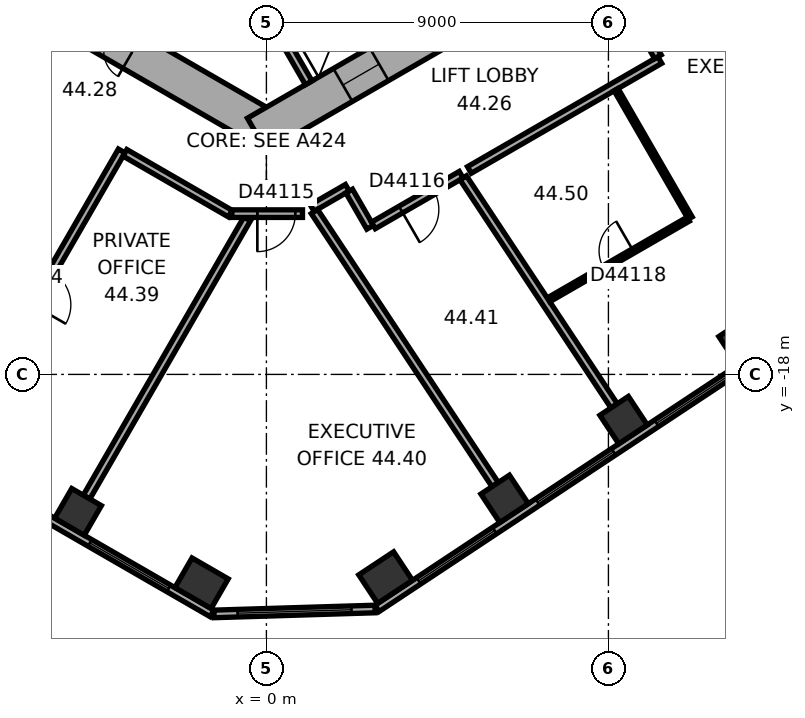
"""IFC4 building model, lengths in metres.
Left out: names, types, materials, properties, quantities, classifications, styles, units other than length and angle.
Written with IfcOpenShell. Run it as: python <this file> out.ifc"""

import sys

from ifc_helpers import new_model, si_unit, direction, frame, frame_2d, origin, origin_2d, place, context, subcontext, project, spatial, rectangle, extrude, element, fill, save


model = new_model("IFC4")
c1 = context("Model", 3, precision=1e-05, world=origin(), true_north=direction((0.0, 1.0)))
c2 = subcontext(c1, "Body", "Model", "MODEL_VIEW")
j1 = project(units=[si_unit("LENGTHUNIT", "METRE"), si_unit("PLANEANGLEUNIT", "RADIAN")], contexts=[c1])
p1 = place(None, origin())
s1 = spatial("IfcSite", under=j1, at=p1, CompositionType="ELEMENT")
p2 = place(p1, origin())
s2 = spatial("IfcBuilding", under=s1, at=p2, CompositionType="ELEMENT")
p3 = place(p2, frame((0.0, 0.0, 179.9)))
s3 = spatial("IfcBuildingStorey", under=s2, at=p3, CompositionType="ELEMENT", Elevation=179.9)
p4 = place(p3, frame((-4.958, -21.617, 0.0), z_axis=(0.0, 0.0, 1.0), x_axis=(0.866025403784, -0.5, 0.0)))
e1 = element("IfcColumn", 1, at=p4, inside=s3, PredefinedType="COLUMN", context=c2, shape_type="SweptSolid", body=[
    extrude(rectangle(XDim=0.9, YDim=0.9, at=origin_2d()), origin(), (0.0, 0.0, 1.0), 3.7),
])
for number, where, z_axis, x_axis in (
    (2, (-1.706, -23.494, 0.0), (0.0, 0.0, 1.0), (0.866, -0.5, 0.0)),
    (3, (3.137, -23.346, 0.0), (0.0, 0.0, 1.0), (0.834, 0.552, 0.0)),
):
    element("IfcColumn", number, at=place(p3, frame(where, z_axis=z_axis, x_axis=x_axis)), inside=s3, PredefinedType="COLUMN", context=c2, shape_type="SweptSolid", body=[
        extrude(rectangle(XDim=1.1, YDim=0.9, at=origin_2d()), origin(), (0.0, 0.0, 1.0), 3.7),
    ])
for number, where, z_axis, x_axis in (
    (4, (6.268, -21.274, 0.0), (0.0, 0.0, 1.0), (0.834, 0.552, 0.0)),
    (5, (9.398, -19.202, 0.0), (0.0, 0.0, 1.0), (0.834, 0.552, 0.0)),
    (6, (12.529, -17.13, 0.0), (0.0, 0.0, 1.0), (0.834, 0.552, 0.0)),
):
    element("IfcColumn", number, at=place(p3, frame(where, z_axis=z_axis, x_axis=x_axis)), inside=s3, PredefinedType="COLUMN", context=c2, shape_type="SweptSolid", body=[
        extrude(rectangle(XDim=0.9, YDim=0.9, at=origin_2d()), origin(), (0.0, 0.0, 1.0), 3.7),
    ])
p5 = place(p3, frame((-10.25, -5.629, 0.0), z_axis=(0.0, 0.0, 1.0), x_axis=(0.866022616891, -0.50000482701, 0.0)))
e7 = element("IfcWall", 7, at=p5, inside=s3, PredefinedType="SHEAR", context=c2, shape_type="SweptSolid", body=[
    extrude(rectangle(XDim=12.125, YDim=1.0, at=frame_2d((6.062, 0.0))), origin(), (0.0, 0.0, 1.0), 3.7),
])
p6 = place(p5, frame((6.262, 0.0, 0.0)))
e8 = element("IfcOpeningElement", 8, at=p6, cuts=e7, PredefinedType="OPENING", context=c2, shape_type="SweptSolid", body=[
    extrude(rectangle(XDim=1.5, YDim=2.1, at=frame_2d((0.75, 1.05))), frame((0.0, 0.51, 0.0), z_axis=(0.0, -1.0, 0.0), x_axis=(1.0, 0.0, 0.0)), (0.0, 0.0, 1.0), 1.02),
])
p7 = place(p5, frame((1.712, 0.0, 0.0)))
e9 = element("IfcOpeningElement", 9, at=p7, cuts=e7, PredefinedType="OPENING", context=c2, shape_type="SweptSolid", body=[
    extrude(rectangle(XDim=1.1, YDim=2.1, at=frame_2d((0.55, 1.05))), frame((0.0, 0.51, 0.0), z_axis=(0.0, -1.0, 0.0), x_axis=(1.0, 0.0, 0.0)), (0.0, 0.0, 1.0), 1.02),
])
p8 = place(p5, frame((4.312, 0.0, 0.0)))
e10 = element("IfcOpeningElement", 10, at=p8, cuts=e7, PredefinedType="OPENING", context=c2, shape_type="SweptSolid", body=[
    extrude(rectangle(XDim=1.1, YDim=2.1, at=frame_2d((0.55, 1.05))), frame((0.0, 0.51, 0.0), z_axis=(0.0, -1.0, 0.0), x_axis=(1.0, 0.0, 0.0)), (0.0, 0.0, 1.0), 1.02),
])
p9 = place(p3, frame((-0.25, -11.691, 0.0), z_axis=(0.0, 0.0, 1.0), x_axis=(0.866022616891, 0.50000482701, 0.0)))
e11 = element("IfcWall", 11, at=p9, inside=s3, PredefinedType="SHEAR", context=c2, shape_type="SweptSolid", body=[
    extrude(rectangle(XDim=12.125, YDim=1.0, at=frame_2d((6.062, 0.0))), origin(), (0.0, 0.0, 1.0), 3.7),
])
p10 = place(p9, frame((2.612, 0.0, 0.0)))
e12 = element("IfcOpeningElement", 12, at=p10, cuts=e11, PredefinedType="OPENING", context=c2, shape_type="SweptSolid", body=[
    extrude(rectangle(XDim=1.1, YDim=2.1, at=frame_2d((0.55, 1.05))), frame((0.0, 0.51, 0.0), z_axis=(0.0, -1.0, 0.0), x_axis=(1.0, 0.0, 0.0)), (0.0, 0.0, 1.0), 1.02),
])
p11 = place(p9, frame((5.212, 0.0, 0.0)))
e13 = element("IfcOpeningElement", 13, at=p11, cuts=e11, PredefinedType="OPENING", context=c2, shape_type="SweptSolid", body=[
    extrude(rectangle(XDim=1.1, YDim=2.1, at=frame_2d((0.55, 1.05))), frame((0.0, 0.51, 0.0), z_axis=(0.0, -1.0, 0.0), x_axis=(1.0, 0.0, 0.0)), (0.0, 0.0, 1.0), 1.02),
])
p12 = place(p9, frame((7.812, 0.0, 0.0)))
e14 = element("IfcOpeningElement", 14, at=p12, cuts=e11, PredefinedType="OPENING", context=c2, shape_type="SweptSolid", body=[
    extrude(rectangle(XDim=1.1, YDim=2.1, at=frame_2d((0.55, 1.05))), frame((0.0, 0.51, 0.0), z_axis=(0.0, -1.0, 0.0), x_axis=(1.0, 0.0, 0.0)), (0.0, 0.0, 1.0), 1.02),
])
p13 = place(p3, frame((-18.789, -14.267, 0.0), z_axis=(0.0, 0.0, 1.0), x_axis=(0.866023315909, -0.500003616288, 0.0)))
e15 = element("IfcWall", 15, at=p13, inside=s3, PredefinedType="STANDARD", context=c2, shape_type="SweptSolid", body=[
    extrude(rectangle(XDim=20.044, YDim=0.2, at=frame_2d((10.022, 0.0))), origin(), (0.0, 0.0, 1.0), 3.7),
])
p14 = place(p13, frame((1.314, 0.0, 0.9)))
e16 = element("IfcOpeningElement", 16, at=p14, cuts=e15, PredefinedType="OPENING", context=c2, shape_type="SweptSolid", body=[
    extrude(rectangle(XDim=2.4, YDim=2.0, at=frame_2d((1.2, 1.0))), frame((0.0, 0.11, 0.0), z_axis=(0.0, -1.0, 0.0), x_axis=(1.0, 0.0, 0.0)), (0.0, 0.0, 1.0), 0.22),
])
p15 = place(p13, frame((5.069, 0.0, 0.9)))
e17 = element("IfcOpeningElement", 17, at=p15, cuts=e15, PredefinedType="OPENING", context=c2, shape_type="SweptSolid", body=[
    extrude(rectangle(XDim=2.4, YDim=2.0, at=frame_2d((1.2, 1.0))), frame((0.0, 0.11, 0.0), z_axis=(0.0, -1.0, 0.0), x_axis=(1.0, 0.0, 0.0)), (0.0, 0.0, 1.0), 0.22),
])
p16 = place(p13, frame((8.823, 0.0, 0.9)))
e18 = element("IfcOpeningElement", 18, at=p16, cuts=e15, PredefinedType="OPENING", context=c2, shape_type="SweptSolid", body=[
    extrude(rectangle(XDim=2.4, YDim=2.0, at=frame_2d((1.2, 1.0))), frame((0.0, 0.11, 0.0), z_axis=(0.0, -1.0, 0.0), x_axis=(1.0, 0.0, 0.0)), (0.0, 0.0, 1.0), 0.22),
])
p17 = place(p13, frame((12.577, 0.0, 0.9)))
e19 = element("IfcOpeningElement", 19, at=p17, cuts=e15, PredefinedType="OPENING", context=c2, shape_type="SweptSolid", body=[
    extrude(rectangle(XDim=2.4, YDim=2.0, at=frame_2d((1.2, 1.0))), frame((0.0, 0.11, 0.0), z_axis=(0.0, -1.0, 0.0), x_axis=(1.0, 0.0, 0.0)), (0.0, 0.0, 1.0), 0.22),
])
p18 = place(p13, frame((16.331, 0.0, 0.9)))
e20 = element("IfcOpeningElement", 20, at=p18, cuts=e15, PredefinedType="OPENING", context=c2, shape_type="SweptSolid", body=[
    extrude(rectangle(XDim=2.4, YDim=2.0, at=frame_2d((1.2, 1.0))), frame((0.0, 0.11, 0.0), z_axis=(0.0, -1.0, 0.0), x_axis=(1.0, 0.0, 0.0)), (0.0, 0.0, 1.0), 0.22),
])
p19 = place(p3, frame((-1.378, -24.302, 0.0), z_axis=(0.0, 0.0, 1.0), x_axis=(0.999533857267, 0.030529791629, 0.0)))
e21 = element("IfcWall", 21, at=p19, inside=s3, PredefinedType="STANDARD", context=c2, shape_type="SweptSolid", body=[
    extrude(rectangle(XDim=4.238, YDim=0.2, at=frame_2d((2.119, 0.0))), origin(), (0.0, 0.0, 1.0), 3.7),
])
p20 = place(p19, frame((0.619, 0.0, 0.9)))
e22 = element("IfcOpeningElement", 22, at=p20, cuts=e21, PredefinedType="OPENING", context=c2, shape_type="SweptSolid", body=[
    extrude(rectangle(XDim=3.0, YDim=2.0, at=frame_2d((1.5, 1.0))), frame((0.0, 0.11, 0.0), z_axis=(0.0, -1.0, 0.0), x_axis=(1.0, 0.0, 0.0)), (0.0, 0.0, 1.0), 0.22),
])
p21 = place(p3, frame((2.911, -24.156, 0.0), z_axis=(0.0, 0.0, 1.0), x_axis=(0.833882163564, 0.551942512668, 0.0)))
e23 = element("IfcWall", 23, at=p21, inside=s3, PredefinedType="STANDARD", context=c2, shape_type="SweptSolid", body=[
    extrude(rectangle(XDim=20.044, YDim=0.2, at=frame_2d((10.022, 0.0))), origin(), (0.0, 0.0, 1.0), 3.7),
])
p22 = place(p21, frame((1.313, 0.0, 0.9)))
e24 = element("IfcOpeningElement", 24, at=p22, cuts=e23, PredefinedType="OPENING", context=c2, shape_type="SweptSolid", body=[
    extrude(rectangle(XDim=2.4, YDim=2.0, at=frame_2d((1.2, 1.0))), frame((0.0, 0.11, 0.0), z_axis=(0.0, -1.0, 0.0), x_axis=(1.0, 0.0, 0.0)), (0.0, 0.0, 1.0), 0.22),
])
p23 = place(p21, frame((5.067, 0.0, 0.9)))
e25 = element("IfcOpeningElement", 25, at=p23, cuts=e23, PredefinedType="OPENING", context=c2, shape_type="SweptSolid", body=[
    extrude(rectangle(XDim=2.4, YDim=2.0, at=frame_2d((1.2, 1.0))), frame((0.0, 0.11, 0.0), z_axis=(0.0, -1.0, 0.0), x_axis=(1.0, 0.0, 0.0)), (0.0, 0.0, 1.0), 0.22),
])
p24 = place(p21, frame((8.821, 0.0, 0.9)))
e26 = element("IfcOpeningElement", 26, at=p24, cuts=e23, PredefinedType="OPENING", context=c2, shape_type="SweptSolid", body=[
    extrude(rectangle(XDim=2.4, YDim=2.0, at=frame_2d((1.2, 1.0))), frame((0.0, 0.11, 0.0), z_axis=(0.0, -1.0, 0.0), x_axis=(1.0, 0.0, 0.0)), (0.0, 0.0, 1.0), 0.22),
])
p25 = place(p21, frame((12.575, 0.0, 0.9)))
e27 = element("IfcOpeningElement", 27, at=p25, cuts=e23, PredefinedType="OPENING", context=c2, shape_type="SweptSolid", body=[
    extrude(rectangle(XDim=2.4, YDim=2.0, at=frame_2d((1.2, 1.0))), frame((0.0, 0.11, 0.0), z_axis=(0.0, -1.0, 0.0), x_axis=(1.0, 0.0, 0.0)), (0.0, 0.0, 1.0), 0.22),
])
p26 = place(p21, frame((16.329, 0.0, 0.9)))
e28 = element("IfcOpeningElement", 28, at=p26, cuts=e23, PredefinedType="OPENING", context=c2, shape_type="SweptSolid", body=[
    extrude(rectangle(XDim=2.4, YDim=2.0, at=frame_2d((1.2, 1.0))), frame((0.0, 0.11, 0.0), z_axis=(0.0, -1.0, 0.0), x_axis=(1.0, 0.0, 0.0)), (0.0, 0.0, 1.0), 0.22),
])
p27 = place(p3, frame((0.013, -8.422, 0.0), z_axis=(0.0, 0.0, 1.0), x_axis=(0.500077893725, -0.86598042715, 0.0)))
e29 = element("IfcWall", 29, at=p27, inside=s3, PredefinedType="PARTITIONING", context=c2, shape_type="SweptSolid", body=[
    extrude(rectangle(XDim=2.2, YDim=0.2, at=frame_2d((1.1, 0.0))), origin(), (0.0, 0.0, 1.0), 3.42),
])
p28 = place(p3, frame((-7.984, -19.351, 0.0), z_axis=(0.0, 0.0, 1.0), x_axis=(0.500010139422, 0.866019549707, 0.0)))
e30 = element("IfcWall", 30, at=p28, inside=s3, PredefinedType="PARTITIONING", context=c2, shape_type="SweptSolid", body=[
    extrude(rectangle(XDim=8.35, YDim=0.2, at=frame_2d((4.175, 0.0))), origin(), (0.0, 0.0, 1.0), 3.42),
])
p29 = place(p28, frame((3.675, 0.0, 0.0)))
e31 = element("IfcOpeningElement", 31, at=p29, cuts=e30, PredefinedType="OPENING", context=c2, shape_type="SweptSolid", body=[
    extrude(rectangle(XDim=1.0, YDim=2.1, at=frame_2d((0.5, 1.05))), frame((0.0, 0.11, 0.0), z_axis=(0.0, -1.0, 0.0), x_axis=(1.0, 0.0, 0.0)), (0.0, 0.0, 1.0), 0.22),
])
p30 = place(p3, frame((-4.732, -21.228, 0.0), z_axis=(0.0, 0.0, 1.0), x_axis=(0.500000843414, 0.866024916838, 0.0)))
e32 = element("IfcWall", 32, at=p30, inside=s3, PredefinedType="PARTITIONING", context=c2, shape_type="SweptSolid", body=[
    extrude(rectangle(XDim=8.452, YDim=0.2, at=frame_2d((4.226, 0.0))), origin(), (0.0, 0.0, 1.0), 3.42),
])
p31 = place(p3, frame((-3.722, -12.169, 0.0), z_axis=(0.0, 0.0, 1.0), x_axis=(0.866033163891, -0.499986558861, 0.0)))
e33 = element("IfcWall", 33, at=p31, inside=s3, PredefinedType="PARTITIONING", context=c2, shape_type="SweptSolid", body=[
    extrude(rectangle(XDim=3.201, YDim=0.2, at=frame_2d((1.6, 0.0))), origin(), (0.0, 0.0, 1.0), 3.42),
])
p32 = place(p3, frame((-0.91, -13.77, 0.0), z_axis=(0.0, 0.0, 1.0), x_axis=(1.0, 0.0, 0.0)))
e34 = element("IfcWall", 34, at=p32, inside=s3, PredefinedType="PARTITIONING", context=c2, shape_type="SweptSolid", body=[
    extrude(rectangle(XDim=1.86, YDim=0.2, at=frame_2d((0.93, 0.0))), origin(), (0.0, 0.0, 1.0), 3.42),
])
p33 = place(p32, frame((0.672, 0.0, 0.0)))
e35 = element("IfcOpeningElement", 35, at=p33, cuts=e34, PredefinedType="OPENING", context=c2, shape_type="SweptSolid", body=[
    extrude(rectangle(XDim=1.0, YDim=2.1, at=frame_2d((0.5, 1.05))), frame((0.0, 0.11, 0.0), z_axis=(0.0, -1.0, 0.0), x_axis=(1.0, 0.0, 0.0)), (0.0, 0.0, 1.0), 0.22),
])
p34 = place(p3, frame((1.204, -13.623, 0.0), z_axis=(0.0, 0.0, 1.0), x_axis=(0.866040989419, 0.499973003918, 0.0)))
e36 = element("IfcWall", 36, at=p34, inside=s3, PredefinedType="PARTITIONING", context=c2, shape_type="SweptSolid", body=[
    extrude(rectangle(XDim=1.068, YDim=0.2, at=frame_2d((0.534, 0.0))), origin(), (0.0, 0.0, 1.0), 3.42),
])
p35 = place(p3, frame((2.179, -13.176, 0.0), z_axis=(0.0, 0.0, 1.0), x_axis=(0.499978356969, -0.866037899034, 0.0)))
e37 = element("IfcWall", 37, at=p35, inside=s3, PredefinedType="PARTITIONING", context=c2, shape_type="SweptSolid", body=[
    extrude(rectangle(XDim=1.101, YDim=0.2, at=frame_2d((0.551, 0.0))), origin(), (0.0, 0.0, 1.0), 3.42),
])
p36 = place(p3, frame((2.816, -14.079, 0.0), z_axis=(0.0, 0.0, 1.0), x_axis=(0.866008705299, 0.50002892151, 0.0)))
e38 = element("IfcWall", 38, at=p36, inside=s3, PredefinedType="PARTITIONING", context=c2, shape_type="SweptSolid", body=[
    extrude(rectangle(XDim=2.666, YDim=0.2, at=frame_2d((1.333, 0.0))), origin(), (0.0, 0.0, 1.0), 3.42),
])
p37 = place(p36, frame((0.833, 0.0, 0.0)))
e39 = element("IfcOpeningElement", 39, at=p37, cuts=e38, PredefinedType="OPENING", context=c2, shape_type="SweptSolid", body=[
    extrude(rectangle(XDim=1.0, YDim=2.1, at=frame_2d((0.5, 1.05))), frame((0.0, 0.11, 0.0), z_axis=(0.0, -1.0, 0.0), x_axis=(1.0, 0.0, 0.0)), (0.0, 0.0, 1.0), 0.22),
])
p38 = place(p3, frame((5.342, -12.621, 0.0), z_axis=(0.0, 0.0, 1.0), x_axis=(0.866024665123, 0.500001279396, 0.0)))
e40 = element("IfcWall", 40, at=p38, inside=s3, PredefinedType="PARTITIONING", context=c2, shape_type="SweptSolid", body=[
    extrude(rectangle(XDim=5.786, YDim=0.2, at=frame_2d((2.893, 0.0))), origin(), (0.0, 0.0, 1.0), 3.42),
])
p39 = place(p3, frame((6.02, -20.899, 0.0), z_axis=(0.0, 0.0, 1.0), x_axis=(-0.551943990108, 0.833881185651, 0.0)))
e41 = element("IfcWall", 41, at=p39, inside=s3, PredefinedType="PARTITIONING", context=c2, shape_type="SweptSolid", body=[
    extrude(rectangle(XDim=8.615, YDim=0.2, at=frame_2d((4.308, 0.0))), origin(), (0.0, 0.0, 1.0), 3.42),
])
p40 = place(p3, frame((9.15, -18.827, 0.0), z_axis=(0.0, 0.0, 1.0), x_axis=(-0.551939801345, 0.833883958169, 0.0)))
e42 = element("IfcWall", 42, at=p40, inside=s3, PredefinedType="PARTITIONING", context=c2, shape_type="SweptSolid", body=[
    extrude(rectangle(XDim=7.192, YDim=0.2, at=frame_2d((3.596, 0.0))), origin(), (0.0, 0.0, 1.0), 2.87),
])
p41 = place(p3, frame((9.202, -10.508, 0.0), z_axis=(0.0, 0.0, 1.0), x_axis=(0.500043961785, -0.866000020948, 0.0)))
e43 = element("IfcWall", 43, at=p41, inside=s3, PredefinedType="PARTITIONING", context=c2, shape_type="SweptSolid", body=[
    extrude(rectangle(XDim=3.9, YDim=0.12, at=frame_2d((1.95, 0.0))), origin(), (0.0, 0.0, 1.0), 3.42),
])
p42 = place(p3, frame((10.302, -9.642, 0.0), z_axis=(0.0, 0.0, 1.0), x_axis=(-0.500074377092, 0.865982457891, 0.0)))
e44 = element("IfcWall", 44, at=p42, inside=s3, PredefinedType="PARTITIONING", context=c2, shape_type="SweptSolid", body=[
    extrude(rectangle(XDim=1.001, YDim=0.2, at=frame_2d((0.5, 0.0))), origin(), (0.0, 0.0, 1.0), 3.42),
])
p43 = place(p3, frame((11.1, -13.915, 0.0), z_axis=(0.0, 0.0, 1.0), x_axis=(-0.866048475386, -0.499960036685, 0.0)))
e45 = element("IfcWall", 45, at=p43, inside=s3, PredefinedType="PARTITIONING", context=c2, shape_type="SweptSolid", body=[
    extrude(rectangle(XDim=4.24, YDim=0.12, at=frame_2d((2.12, 0.0))), origin(), (0.0, 0.0, 1.0), 3.42),
])
p44 = place(p43, frame((1.67, 0.0, 0.0)))
e46 = element("IfcOpeningElement", 46, at=p44, cuts=e45, PredefinedType="OPENING", context=c2, shape_type="SweptSolid", body=[
    extrude(rectangle(XDim=0.9, YDim=2.1, at=frame_2d((0.45, 1.05))), frame((0.0, 0.07, 0.0), z_axis=(0.0, -1.0, 0.0), x_axis=(1.0, 0.0, 0.0)), (0.0, 0.0, 1.0), 0.14),
])
p45 = place(p18, origin())
e47 = element("IfcWindow", 47, at=p45, inside=s3, PartitioningType="SINGLE_PANEL", PredefinedType="WINDOW", context=c2, shape_type="SweptSolid", body=[
    extrude(rectangle(XDim=2.4, YDim=2.0, at=frame_2d((1.2, 1.0))), frame((0.0, 0.03, 0.0), z_axis=(0.0, -1.0, 0.0), x_axis=(1.0, 0.0, 0.0)), (0.0, 0.0, 1.0), 0.06),
])
fill(e20, e47)
p46 = place(p20, origin())
e48 = element("IfcWindow", 48, at=p46, inside=s3, PartitioningType="SINGLE_PANEL", PredefinedType="WINDOW", context=c2, shape_type="SweptSolid", body=[
    extrude(rectangle(XDim=3.0, YDim=2.0, at=frame_2d((1.5, 1.0))), frame((0.0, 0.03, 0.0), z_axis=(0.0, -1.0, 0.0), x_axis=(1.0, 0.0, 0.0)), (0.0, 0.0, 1.0), 0.06),
])
fill(e22, e48)
p47 = place(p22, origin())
e49 = element("IfcWindow", 49, at=p47, inside=s3, PartitioningType="SINGLE_PANEL", PredefinedType="WINDOW", context=c2, shape_type="SweptSolid", body=[
    extrude(rectangle(XDim=2.4, YDim=2.0, at=frame_2d((1.2, 1.0))), frame((0.0, 0.03, 0.0), z_axis=(0.0, -1.0, 0.0), x_axis=(1.0, 0.0, 0.0)), (0.0, 0.0, 1.0), 0.06),
])
fill(e24, e49)
p48 = place(p23, origin())
e50 = element("IfcWindow", 50, at=p48, inside=s3, PartitioningType="SINGLE_PANEL", PredefinedType="WINDOW", context=c2, shape_type="SweptSolid", body=[
    extrude(rectangle(XDim=2.4, YDim=2.0, at=frame_2d((1.2, 1.0))), frame((0.0, 0.03, 0.0), z_axis=(0.0, -1.0, 0.0), x_axis=(1.0, 0.0, 0.0)), (0.0, 0.0, 1.0), 0.06),
])
fill(e25, e50)
p49 = place(p24, origin())
e51 = element("IfcWindow", 51, at=p49, inside=s3, PartitioningType="SINGLE_PANEL", PredefinedType="WINDOW", context=c2, shape_type="SweptSolid", body=[
    extrude(rectangle(XDim=2.4, YDim=2.0, at=frame_2d((1.2, 1.0))), frame((0.0, 0.03, 0.0), z_axis=(0.0, -1.0, 0.0), x_axis=(1.0, 0.0, 0.0)), (0.0, 0.0, 1.0), 0.06),
])
fill(e26, e51)
p50 = place(p10, origin())
e52 = element("IfcDoor", 52, at=p50, inside=s3, OperationType="DOUBLE_DOOR_SLIDING", PredefinedType="DOOR", context=c2, shape_type="SweptSolid", body=[
    extrude(rectangle(XDim=1.1, YDim=2.1, at=frame_2d((0.55, 1.05))), frame((0.0, 0.025, 0.0), z_axis=(0.0, -1.0, 0.0), x_axis=(1.0, 0.0, 0.0)), (0.0, 0.0, 1.0), 0.05),
])
fill(e12, e52)
p51 = place(p29, origin())
e53 = element("IfcDoor", 53, at=p51, inside=s3, OperationType="SINGLE_SWING_LEFT", PredefinedType="DOOR", context=c2, shape_type="SweptSolid", body=[
    extrude(rectangle(XDim=1.0, YDim=2.1, at=frame_2d((0.5, 1.05))), frame((0.0, 0.025, 0.0), z_axis=(0.0, -1.0, 0.0), x_axis=(1.0, 0.0, 0.0)), (0.0, 0.0, 1.0), 0.05),
])
fill(e31, e53)
p52 = place(p33, origin())
e54 = element("IfcDoor", 54, at=p52, inside=s3, OperationType="SINGLE_SWING_LEFT", PredefinedType="DOOR", context=c2, shape_type="SweptSolid", body=[
    extrude(rectangle(XDim=1.0, YDim=2.1, at=frame_2d((0.5, 1.05))), frame((0.0, 0.025, 0.0), z_axis=(0.0, -1.0, 0.0), x_axis=(1.0, 0.0, 0.0)), (0.0, 0.0, 1.0), 0.05),
])
fill(e35, e54)
p53 = place(p37, origin())
e55 = element("IfcDoor", 55, at=p53, inside=s3, OperationType="SINGLE_SWING_LEFT", PredefinedType="DOOR", context=c2, shape_type="SweptSolid", body=[
    extrude(rectangle(XDim=1.0, YDim=2.1, at=frame_2d((0.5, 1.05))), frame((0.0, 0.025, 0.0), z_axis=(0.0, -1.0, 0.0), x_axis=(1.0, 0.0, 0.0)), (0.0, 0.0, 1.0), 0.05),
])
fill(e39, e55)
p54 = place(p44, origin())
e56 = element("IfcDoor", 56, at=p54, inside=s3, OperationType="SINGLE_SWING_LEFT", PredefinedType="DOOR", context=c2, shape_type="SweptSolid", body=[
    extrude(rectangle(XDim=0.9, YDim=2.1, at=frame_2d((0.45, 1.05))), frame((0.0, 0.025, 0.0), z_axis=(0.0, -1.0, 0.0), x_axis=(1.0, 0.0, 0.0)), (0.0, 0.0, 1.0), 0.05),
])
fill(e46, e56)
save(model, sys.argv[1])
